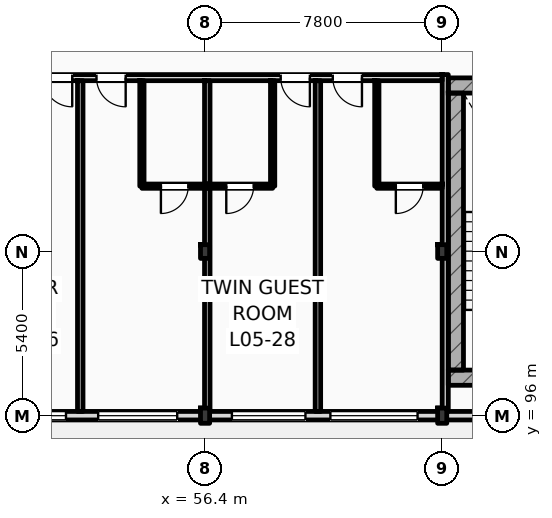
"""IFC4 building model, lengths in metres.
Left out: names, types, materials, properties, quantities, classifications, styles, units other than length and angle.
Written with IfcOpenShell. Run it as: python <this file> out.ifc"""

import sys

from ifc_helpers import new_model, si_unit, direction, frame, frame_2d, origin, origin_2d, place, context, subcontext, project, spatial, rectangle, i_section, extrude, element, fill, save


model = new_model("IFC4")
c1 = context("Model", 3, precision=1e-05, world=origin(), true_north=direction((0.0, 1.0)))
c2 = subcontext(c1, "Body", "Model", "MODEL_VIEW")
j1 = project(units=[si_unit("LENGTHUNIT", "METRE"), si_unit("PLANEANGLEUNIT", "RADIAN")], contexts=[c1])
p1 = place(None, origin())
s1 = spatial("IfcSite", under=j1, at=p1, CompositionType="ELEMENT")
p2 = place(p1, origin())
s2 = spatial("IfcBuilding", under=s1, at=p2, CompositionType="ELEMENT")
p3 = place(p2, frame((0.0, 0.0, 24.6)))
s3 = spatial("IfcBuildingStorey", under=s2, at=p3, CompositionType="ELEMENT", Elevation=24.6)
p4 = place(p3, frame((56.4, 96.0, 0.0), z_axis=(0.0, 0.0, 1.0), x_axis=(1.0, 0.0, 0.0)))
e1 = element("IfcColumn", 1, at=p4, inside=s3, PredefinedType="COLUMN", context=c2, shape_type="SweptSolid", body=[
    extrude(i_section(OverallWidth=0.3, OverallDepth=0.5, WebThickness=0.014, FlangeThickness=0.028, FilletRadius=0.027, at=origin_2d()), origin(), (0.0, 0.0, 1.0), 3.6),
])
p5 = place(p3, frame((56.4, 101.4, 0.0), z_axis=(0.0, 0.0, 1.0), x_axis=(1.0, 0.0, 0.0)))
e2 = element("IfcColumn", 2, at=p5, inside=s3, PredefinedType="COLUMN", context=c2, shape_type="SweptSolid", body=[
    extrude(i_section(OverallWidth=0.3, OverallDepth=0.45, WebThickness=0.014, FlangeThickness=0.026, FilletRadius=0.027, at=origin_2d()), origin(), (0.0, 0.0, 1.0), 3.6),
])
p6 = place(p3, frame((64.2, 96.0, 0.0), z_axis=(0.0, 0.0, 1.0), x_axis=(1.0, 0.0, 0.0)))
e3 = element("IfcColumn", 3, at=p6, inside=s3, PredefinedType="COLUMN", context=c2, shape_type="SweptSolid", body=[
    extrude(i_section(OverallWidth=0.3, OverallDepth=0.5, WebThickness=0.014, FlangeThickness=0.028, FilletRadius=0.027, at=origin_2d()), origin(), (0.0, 0.0, 1.0), 3.6),
])
p7 = place(p3, frame((64.2, 101.4, 0.0), z_axis=(0.0, 0.0, 1.0), x_axis=(1.0, 0.0, 0.0)))
e4 = element("IfcColumn", 4, at=p7, inside=s3, PredefinedType="COLUMN", context=c2, shape_type="SweptSolid", body=[
    extrude(i_section(OverallWidth=0.3, OverallDepth=0.45, WebThickness=0.014, FlangeThickness=0.026, FilletRadius=0.027, at=origin_2d()), origin(), (0.0, 0.0, 1.0), 3.6),
])
for number, where, z_axis, x_axis in (
    (5, (64.4, 106.862, 0.0), (0.0, 0.0, 1.0), (1.0, 0.0, 0.0)),
    (6, (64.4, 97.25, 0.0), (0.0, 0.0, 1.0), (1.0, 0.0, 0.0)),
):
    element("IfcWall", number, at=place(p3, frame(where, z_axis=z_axis, x_axis=x_axis)), inside=s3, PredefinedType="SHEAR", context=c2, shape_type="SweptSolid", body=[
        extrude(rectangle(XDim=5.16, YDim=0.5, at=frame_2d((2.58, 0.0))), origin(), (0.0, 0.0, 1.0), 3.6),
    ])
p8 = place(p3, frame((64.65, 97.5, 0.0), z_axis=(0.0, 0.0, 1.0), x_axis=(0.0, 1.0, 0.0)))
e7 = element("IfcWall", 7, at=p8, inside=s3, PredefinedType="SHEAR", context=c2, shape_type="SweptSolid", body=[
    extrude(rectangle(XDim=9.112, YDim=0.5, at=frame_2d((4.556, 0.0))), origin(), (0.0, 0.0, 1.0), 3.6),
])
p9 = place(p3, frame((25.2, 96.0, 0.0), z_axis=(0.0, 0.0, 1.0), x_axis=(1.0, 0.0, 0.0)))
e8 = element("IfcWall", 8, at=p9, inside=s3, PredefinedType="STANDARD", context=c2, shape_type="SweptSolid", body=[
    extrude(rectangle(XDim=94.8, YDim=0.28, at=frame_2d((47.4, 0.0))), origin(), (0.0, 0.0, 1.0), 2.78),
])
p10 = place(p9, frame((16.539, 0.0, 0.9)))
e9 = element("IfcOpeningElement", 9, at=p10, cuts=e8, PredefinedType="OPENING", context=c2, shape_type="SweptSolid", body=[
    extrude(rectangle(XDim=1.75, YDim=1.7, at=frame_2d((0.875, 0.85))), frame((0.0, 0.15, 0.0), z_axis=(0.0, -1.0, 0.0), x_axis=(1.0, 0.0, 0.0)), (0.0, 0.0, 1.0), 0.3),
])
p11 = place(p9, frame((20.367, 0.0, 0.9)))
e10 = element("IfcOpeningElement", 10, at=p11, cuts=e8, PredefinedType="OPENING", context=c2, shape_type="SweptSolid", body=[
    extrude(rectangle(XDim=2.0, YDim=1.7, at=frame_2d((1.0, 0.85))), frame((0.0, 0.15, 0.0), z_axis=(0.0, -1.0, 0.0), x_axis=(1.0, 0.0, 0.0)), (0.0, 0.0, 1.0), 0.3),
])
p12 = place(p9, frame((24.326, 0.0, 0.9)))
e11 = element("IfcOpeningElement", 11, at=p12, cuts=e8, PredefinedType="OPENING", context=c2, shape_type="SweptSolid", body=[
    extrude(rectangle(XDim=2.3, YDim=1.7, at=frame_2d((1.15, 0.85))), frame((0.0, 0.15, 0.0), z_axis=(0.0, -1.0, 0.0), x_axis=(1.0, 0.0, 0.0)), (0.0, 0.0, 1.0), 0.3),
])
p13 = place(p9, frame((27.684, 0.0, 0.9)))
e12 = element("IfcOpeningElement", 12, at=p13, cuts=e8, PredefinedType="OPENING", context=c2, shape_type="SweptSolid", body=[
    extrude(rectangle(XDim=2.6, YDim=1.7, at=frame_2d((1.3, 0.85))), frame((0.0, 0.15, 0.0), z_axis=(0.0, -1.0, 0.0), x_axis=(1.0, 0.0, 0.0)), (0.0, 0.0, 1.0), 0.3),
])
p14 = place(p9, frame((32.083, 0.0, 0.9)))
e13 = element("IfcOpeningElement", 13, at=p14, cuts=e8, PredefinedType="OPENING", context=c2, shape_type="SweptSolid", body=[
    extrude(rectangle(XDim=2.419, YDim=1.7, at=frame_2d((1.209, 0.85))), frame((0.0, 0.15, 0.0), z_axis=(0.0, -1.0, 0.0), x_axis=(1.0, 0.0, 0.0)), (0.0, 0.0, 1.0), 0.3),
])
p15 = place(p9, frame((35.322, 0.0, 0.9)))
e14 = element("IfcOpeningElement", 14, at=p15, cuts=e8, PredefinedType="OPENING", context=c2, shape_type="SweptSolid", body=[
    extrude(rectangle(XDim=2.868, YDim=1.7, at=frame_2d((1.434, 0.85))), frame((0.0, 0.15, 0.0), z_axis=(0.0, -1.0, 0.0), x_axis=(1.0, 0.0, 0.0)), (0.0, 0.0, 1.0), 0.3),
])
p16 = place(p9, frame((56.015, 0.0, 0.9)))
e15 = element("IfcOpeningElement", 15, at=p16, cuts=e8, PredefinedType="OPENING", context=c2, shape_type="SweptSolid", body=[
    extrude(rectangle(XDim=1.2, YDim=1.7, at=frame_2d((0.6, 0.85))), frame((0.0, 0.15, 0.0), z_axis=(0.0, -1.0, 0.0), x_axis=(1.0, 0.0, 0.0)), (0.0, 0.0, 1.0), 0.3),
])
p17 = place(p9, frame((59.888, 0.0, 0.9)))
e16 = element("IfcOpeningElement", 16, at=p17, cuts=e8, PredefinedType="OPENING", context=c2, shape_type="SweptSolid", body=[
    extrude(rectangle(XDim=1.35, YDim=1.7, at=frame_2d((0.675, 0.85))), frame((0.0, 0.15, 0.0), z_axis=(0.0, -1.0, 0.0), x_axis=(1.0, 0.0, 0.0)), (0.0, 0.0, 1.0), 0.3),
])
p18 = place(p9, frame((63.799, 0.0, 0.9)))
e17 = element("IfcOpeningElement", 17, at=p18, cuts=e8, PredefinedType="OPENING", context=c2, shape_type="SweptSolid", body=[
    extrude(rectangle(XDim=1.5, YDim=1.7, at=frame_2d((0.75, 0.85))), frame((0.0, 0.15, 0.0), z_axis=(0.0, -1.0, 0.0), x_axis=(1.0, 0.0, 0.0)), (0.0, 0.0, 1.0), 0.3),
])
p19 = place(p9, frame((67.709, 0.0, 0.9)))
e18 = element("IfcOpeningElement", 18, at=p19, cuts=e8, PredefinedType="OPENING", context=c2, shape_type="SweptSolid", body=[
    extrude(rectangle(XDim=1.65, YDim=1.7, at=frame_2d((0.825, 0.85))), frame((0.0, 0.15, 0.0), z_axis=(0.0, -1.0, 0.0), x_axis=(1.0, 0.0, 0.0)), (0.0, 0.0, 1.0), 0.3),
])
p20 = place(p9, frame((71.618, 0.0, 0.9)))
e19 = element("IfcOpeningElement", 19, at=p20, cuts=e8, PredefinedType="OPENING", context=c2, shape_type="SweptSolid", body=[
    extrude(rectangle(XDim=1.8, YDim=1.7, at=frame_2d((0.9, 0.85))), frame((0.0, 0.15, 0.0), z_axis=(0.0, -1.0, 0.0), x_axis=(1.0, 0.0, 0.0)), (0.0, 0.0, 1.0), 0.3),
])
p21 = place(p9, frame((75.129, 0.0, 0.9)))
e20 = element("IfcOpeningElement", 20, at=p21, cuts=e8, PredefinedType="OPENING", context=c2, shape_type="SweptSolid", body=[
    extrude(rectangle(XDim=1.95, YDim=1.7, at=frame_2d((0.975, 0.85))), frame((0.0, 0.15, 0.0), z_axis=(0.0, -1.0, 0.0), x_axis=(1.0, 0.0, 0.0)), (0.0, 0.0, 1.0), 0.3),
])
p22 = place(p9, frame((79.439, 0.0, 0.9)))
e21 = element("IfcOpeningElement", 21, at=p22, cuts=e8, PredefinedType="OPENING", context=c2, shape_type="SweptSolid", body=[
    extrude(rectangle(XDim=2.1, YDim=1.7, at=frame_2d((1.05, 0.85))), frame((0.0, 0.15, 0.0), z_axis=(0.0, -1.0, 0.0), x_axis=(1.0, 0.0, 0.0)), (0.0, 0.0, 1.0), 0.3),
])
p23 = place(p9, frame((83.349, 0.0, 0.9)))
e22 = element("IfcOpeningElement", 22, at=p23, cuts=e8, PredefinedType="OPENING", context=c2, shape_type="SweptSolid", body=[
    extrude(rectangle(XDim=2.25, YDim=1.7, at=frame_2d((1.125, 0.85))), frame((0.0, 0.15, 0.0), z_axis=(0.0, -1.0, 0.0), x_axis=(1.0, 0.0, 0.0)), (0.0, 0.0, 1.0), 0.3),
])
p24 = place(p9, frame((87.258, 0.0, 0.9)))
e23 = element("IfcOpeningElement", 23, at=p24, cuts=e8, PredefinedType="OPENING", context=c2, shape_type="SweptSolid", body=[
    extrude(rectangle(XDim=2.4, YDim=1.7, at=frame_2d((1.2, 0.85))), frame((0.0, 0.15, 0.0), z_axis=(0.0, -1.0, 0.0), x_axis=(1.0, 0.0, 0.0)), (0.0, 0.0, 1.0), 0.3),
])
p25 = place(p9, frame((91.204, 0.0, 0.9)))
e24 = element("IfcOpeningElement", 24, at=p25, cuts=e8, PredefinedType="OPENING", context=c2, shape_type="SweptSolid", body=[
    extrude(rectangle(XDim=2.55, YDim=1.7, at=frame_2d((1.275, 0.85))), frame((0.0, 0.15, 0.0), z_axis=(0.0, -1.0, 0.0), x_axis=(1.0, 0.0, 0.0)), (0.0, 0.0, 1.0), 0.3),
])
p26 = place(p3, frame((40.76, 107.12, 0.0), z_axis=(0.0, 0.0, 1.0), x_axis=(1.0, 0.0, 0.0)))
e25 = element("IfcWall", 25, at=p26, inside=s3, PredefinedType="PARTITIONING", context=c2, shape_type="SweptSolid", body=[
    extrude(rectangle(XDim=23.44, YDim=0.2, at=frame_2d((11.72, 0.0))), origin(), (0.0, 0.0, 1.0), 3.34),
])
p27 = place(p26, frame((2.449, 0.0, 0.0)))
e26 = element("IfcOpeningElement", 26, at=p27, cuts=e25, PredefinedType="OPENING", context=c2, shape_type="SweptSolid", body=[
    extrude(rectangle(XDim=0.96, YDim=2.2, at=frame_2d((0.48, 1.1))), frame((0.0, 0.11, 0.0), z_axis=(0.0, -1.0, 0.0), x_axis=(1.0, 0.0, 0.0)), (0.0, 0.0, 1.0), 0.22),
])
p28 = place(p26, frame((4.253, 0.0, 0.0)))
e27 = element("IfcOpeningElement", 27, at=p28, cuts=e25, PredefinedType="OPENING", context=c2, shape_type="SweptSolid", body=[
    extrude(rectangle(XDim=0.96, YDim=2.2, at=frame_2d((0.48, 1.1))), frame((0.0, 0.11, 0.0), z_axis=(0.0, -1.0, 0.0), x_axis=(1.0, 0.0, 0.0)), (0.0, 0.0, 1.0), 0.22),
])
p29 = place(p26, frame((10.311, 0.0, 0.0)))
e28 = element("IfcOpeningElement", 28, at=p29, cuts=e25, PredefinedType="OPENING", context=c2, shape_type="SweptSolid", body=[
    extrude(rectangle(XDim=0.96, YDim=2.2, at=frame_2d((0.48, 1.1))), frame((0.0, 0.11, 0.0), z_axis=(0.0, -1.0, 0.0), x_axis=(1.0, 0.0, 0.0)), (0.0, 0.0, 1.0), 0.22),
])
p30 = place(p26, frame((12.069, 0.0, 0.0)))
e29 = element("IfcOpeningElement", 29, at=p30, cuts=e25, PredefinedType="OPENING", context=c2, shape_type="SweptSolid", body=[
    extrude(rectangle(XDim=0.96, YDim=2.2, at=frame_2d((0.48, 1.1))), frame((0.0, 0.11, 0.0), z_axis=(0.0, -1.0, 0.0), x_axis=(1.0, 0.0, 0.0)), (0.0, 0.0, 1.0), 0.22),
])
p31 = place(p26, frame((18.128, 0.0, 0.0)))
e30 = element("IfcOpeningElement", 30, at=p31, cuts=e25, PredefinedType="OPENING", context=c2, shape_type="SweptSolid", body=[
    extrude(rectangle(XDim=0.96, YDim=2.2, at=frame_2d((0.48, 1.1))), frame((0.0, 0.11, 0.0), z_axis=(0.0, -1.0, 0.0), x_axis=(1.0, 0.0, 0.0)), (0.0, 0.0, 1.0), 0.22),
])
p32 = place(p26, frame((19.841, 0.0, 0.0)))
e31 = element("IfcOpeningElement", 31, at=p32, cuts=e25, PredefinedType="OPENING", context=c2, shape_type="SweptSolid", body=[
    extrude(rectangle(XDim=0.96, YDim=2.2, at=frame_2d((0.48, 1.1))), frame((0.0, 0.11, 0.0), z_axis=(0.0, -1.0, 0.0), x_axis=(1.0, 0.0, 0.0)), (0.0, 0.0, 1.0), 0.22),
])
p33 = place(p3, frame((64.3, 96.14, 0.0), z_axis=(0.0, 0.0, 1.0), x_axis=(0.0, 1.0, 0.0)))
e32 = element("IfcWall", 32, at=p33, inside=s3, PredefinedType="PARTITIONING", context=c2, shape_type="SweptSolid", body=[
    extrude(rectangle(XDim=11.08, YDim=0.2, at=frame_2d((5.54, 0.0))), origin(), (0.0, 0.0, 1.0), 2.93),
])
p34 = place(p3, frame((52.295, 96.14, 0.0), z_axis=(0.0, 0.0, 1.0), x_axis=(0.0, 1.0, 0.0)))
e33 = element("IfcWall", 33, at=p34, inside=s3, PredefinedType="PARTITIONING", context=c2, shape_type="SweptSolid", body=[
    extrude(rectangle(XDim=10.88, YDim=0.18, at=frame_2d((5.44, 0.0))), origin(), (0.0, 0.0, 1.0), 3.34),
])
p35 = place(p3, frame((56.473, 96.14, 0.0), z_axis=(0.0, 0.0, 1.0), x_axis=(0.0, 1.0, 0.0)))
e34 = element("IfcWall", 34, at=p35, inside=s3, PredefinedType="PARTITIONING", context=c2, shape_type="SweptSolid", body=[
    extrude(rectangle(XDim=10.88, YDim=0.18, at=frame_2d((5.44, 0.0))), origin(), (0.0, 0.0, 1.0), 2.93),
])
p36 = place(p3, frame((54.323, 103.55, 0.0), z_axis=(0.0, 0.0, 1.0), x_axis=(0.0, 1.0, 0.0)))
e35 = element("IfcWall", 35, at=p36, inside=s3, PredefinedType="PARTITIONING", context=c2, shape_type="SweptSolid", body=[
    extrude(rectangle(XDim=3.47, YDim=0.14, at=frame_2d((1.735, 0.0))), origin(), (0.0, 0.0, 1.0), 3.34),
])
p37 = place(p3, frame((54.323, 103.55, 0.0), z_axis=(0.0, 0.0, 1.0), x_axis=(1.0, 0.0, 0.0)))
e36 = element("IfcWall", 36, at=p37, inside=s3, PredefinedType="PARTITIONING", context=c2, shape_type="SweptSolid", body=[
    extrude(rectangle(XDim=2.15, YDim=0.14, at=frame_2d((1.075, 0.0))), origin(), (0.0, 0.0, 1.0), 3.34),
])
p38 = place(p37, frame((0.625, 0.0, 0.0)))
e37 = element("IfcOpeningElement", 37, at=p38, cuts=e36, PredefinedType="OPENING", context=c2, shape_type="SweptSolid", body=[
    extrude(rectangle(XDim=0.9, YDim=2.1, at=frame_2d((0.45, 1.05))), frame((0.0, 0.08, 0.0), z_axis=(0.0, -1.0, 0.0), x_axis=(1.0, 0.0, 0.0)), (0.0, 0.0, 1.0), 0.16),
])
p39 = place(p3, frame((60.112, 96.14, 0.0), z_axis=(0.0, 0.0, 1.0), x_axis=(0.0, 1.0, 0.0)))
e38 = element("IfcWall", 38, at=p39, inside=s3, PredefinedType="PARTITIONING", context=c2, shape_type="SweptSolid", body=[
    extrude(rectangle(XDim=10.88, YDim=0.18, at=frame_2d((5.44, 0.0))), origin(), (0.0, 0.0, 1.0), 3.34),
])
p40 = place(p3, frame((58.623, 103.55, 0.0), z_axis=(0.0, 0.0, 1.0), x_axis=(0.0, 1.0, 0.0)))
e39 = element("IfcWall", 39, at=p40, inside=s3, PredefinedType="PARTITIONING", context=c2, shape_type="SweptSolid", body=[
    extrude(rectangle(XDim=3.47, YDim=0.14, at=frame_2d((1.735, 0.0))), origin(), (0.0, 0.0, 1.0), 3.34),
])
p41 = place(p3, frame((56.473, 103.55, 0.0), z_axis=(0.0, 0.0, 1.0), x_axis=(1.0, 0.0, 0.0)))
e40 = element("IfcWall", 40, at=p41, inside=s3, PredefinedType="PARTITIONING", context=c2, shape_type="SweptSolid", body=[
    extrude(rectangle(XDim=2.15, YDim=0.14, at=frame_2d((1.075, 0.0))), origin(), (0.0, 0.0, 1.0), 3.34),
])
p42 = place(p41, frame((0.625, 0.0, 0.0)))
e41 = element("IfcOpeningElement", 41, at=p42, cuts=e40, PredefinedType="OPENING", context=c2, shape_type="SweptSolid", body=[
    extrude(rectangle(XDim=0.9, YDim=2.1, at=frame_2d((0.45, 1.05))), frame((0.0, 0.08, 0.0), z_axis=(0.0, -1.0, 0.0), x_axis=(1.0, 0.0, 0.0)), (0.0, 0.0, 1.0), 0.16),
])
p43 = place(p3, frame((62.05, 103.55, 0.0), z_axis=(0.0, 0.0, 1.0), x_axis=(0.0, 1.0, 0.0)))
e42 = element("IfcWall", 42, at=p43, inside=s3, PredefinedType="PARTITIONING", context=c2, shape_type="SweptSolid", body=[
    extrude(rectangle(XDim=3.47, YDim=0.14, at=frame_2d((1.735, 0.0))), origin(), (0.0, 0.0, 1.0), 3.34),
])
p44 = place(p3, frame((62.05, 103.55, 0.0), z_axis=(0.0, 0.0, 1.0), x_axis=(1.0, 0.0, 0.0)))
e43 = element("IfcWall", 43, at=p44, inside=s3, PredefinedType="PARTITIONING", context=c2, shape_type="SweptSolid", body=[
    extrude(rectangle(XDim=2.15, YDim=0.14, at=frame_2d((1.075, 0.0))), origin(), (0.0, 0.0, 1.0), 3.34),
])
p45 = place(p44, frame((0.625, 0.0, 0.0)))
e44 = element("IfcOpeningElement", 44, at=p45, cuts=e43, PredefinedType="OPENING", context=c2, shape_type="SweptSolid", body=[
    extrude(rectangle(XDim=0.9, YDim=2.1, at=frame_2d((0.45, 1.05))), frame((0.0, 0.08, 0.0), z_axis=(0.0, -1.0, 0.0), x_axis=(1.0, 0.0, 0.0)), (0.0, 0.0, 1.0), 0.16),
])
p46 = place(p12, origin())
e45 = element("IfcWindow", 45, at=p46, inside=s3, PartitioningType="DOUBLE_PANEL_VERTICAL", PredefinedType="WINDOW", context=c2, shape_type="SweptSolid", body=[
    extrude(rectangle(XDim=2.3, YDim=1.7, at=frame_2d((1.15, 0.85))), frame((0.0, 0.03, 0.0), z_axis=(0.0, -1.0, 0.0), x_axis=(1.0, 0.0, 0.0)), (0.0, 0.0, 1.0), 0.06),
])
fill(e11, e45)
p47 = place(p13, origin())
e46 = element("IfcWindow", 46, at=p47, inside=s3, PartitioningType="DOUBLE_PANEL_VERTICAL", PredefinedType="WINDOW", context=c2, shape_type="SweptSolid", body=[
    extrude(rectangle(XDim=2.6, YDim=1.7, at=frame_2d((1.3, 0.85))), frame((0.0, 0.03, 0.0), z_axis=(0.0, -1.0, 0.0), x_axis=(1.0, 0.0, 0.0)), (0.0, 0.0, 1.0), 0.06),
])
fill(e12, e46)
p48 = place(p14, origin())
e47 = element("IfcWindow", 47, at=p48, inside=s3, PartitioningType="DOUBLE_PANEL_VERTICAL", PredefinedType="WINDOW", context=c2, shape_type="SweptSolid", body=[
    extrude(rectangle(XDim=2.419, YDim=1.7, at=frame_2d((1.209, 0.85))), frame((0.0, 0.03, 0.0), z_axis=(0.0, -1.0, 0.0), x_axis=(1.0, 0.0, 0.0)), (0.0, 0.0, 1.0), 0.06),
])
fill(e13, e47)
p49 = place(p15, origin())
e48 = element("IfcWindow", 48, at=p49, inside=s3, PartitioningType="DOUBLE_PANEL_VERTICAL", PredefinedType="WINDOW", context=c2, shape_type="SweptSolid", body=[
    extrude(rectangle(XDim=2.868, YDim=1.7, at=frame_2d((1.434, 0.85))), frame((0.0, 0.03, 0.0), z_axis=(0.0, -1.0, 0.0), x_axis=(1.0, 0.0, 0.0)), (0.0, 0.0, 1.0), 0.06),
])
fill(e14, e48)
p50 = place(p29, frame((0.96, 0.0, 0.0), z_axis=(0.0, 0.0, 1.0), x_axis=(-1.0, 0.0, 0.0)))
e49 = element("IfcDoor", 49, at=p50, inside=s3, OperationType="SINGLE_SWING_RIGHT", PredefinedType="DOOR", context=c2, shape_type="SweptSolid", body=[
    extrude(rectangle(XDim=0.96, YDim=2.2, at=frame_2d((0.48, 1.1))), frame((0.0, 0.025, 0.0), z_axis=(0.0, -1.0, 0.0), x_axis=(1.0, 0.0, 0.0)), (0.0, 0.0, 1.0), 0.05),
])
fill(e28, e49)
p51 = place(p30, frame((0.96, 0.0, 0.0), z_axis=(0.0, 0.0, 1.0), x_axis=(-1.0, 0.0, 0.0)))
e50 = element("IfcDoor", 50, at=p51, inside=s3, OperationType="SINGLE_SWING_RIGHT", PredefinedType="DOOR", context=c2, shape_type="SweptSolid", body=[
    extrude(rectangle(XDim=0.96, YDim=2.2, at=frame_2d((0.48, 1.1))), frame((0.0, 0.025, 0.0), z_axis=(0.0, -1.0, 0.0), x_axis=(1.0, 0.0, 0.0)), (0.0, 0.0, 1.0), 0.05),
])
fill(e29, e50)
p52 = place(p38, frame((0.9, 0.0, 0.0), z_axis=(0.0, 0.0, 1.0), x_axis=(-1.0, 0.0, 0.0)))
e51 = element("IfcDoor", 51, at=p52, inside=s3, OperationType="SINGLE_SWING_LEFT", PredefinedType="DOOR", context=c2, shape_type="SweptSolid", body=[
    extrude(rectangle(XDim=0.9, YDim=2.1, at=frame_2d((0.45, 1.05))), frame((0.0, 0.025, 0.0), z_axis=(0.0, -1.0, 0.0), x_axis=(1.0, 0.0, 0.0)), (0.0, 0.0, 1.0), 0.05),
])
fill(e37, e51)
p53 = place(p31, frame((0.96, 0.0, 0.0), z_axis=(0.0, 0.0, 1.0), x_axis=(-1.0, 0.0, 0.0)))
e52 = element("IfcDoor", 52, at=p53, inside=s3, OperationType="SINGLE_SWING_RIGHT", PredefinedType="DOOR", context=c2, shape_type="SweptSolid", body=[
    extrude(rectangle(XDim=0.96, YDim=2.2, at=frame_2d((0.48, 1.1))), frame((0.0, 0.025, 0.0), z_axis=(0.0, -1.0, 0.0), x_axis=(1.0, 0.0, 0.0)), (0.0, 0.0, 1.0), 0.05),
])
fill(e30, e52)
p54 = place(p42, frame((0.9, 0.0, 0.0), z_axis=(0.0, 0.0, 1.0), x_axis=(-1.0, 0.0, 0.0)))
e53 = element("IfcDoor", 53, at=p54, inside=s3, OperationType="SINGLE_SWING_LEFT", PredefinedType="DOOR", context=c2, shape_type="SweptSolid", body=[
    extrude(rectangle(XDim=0.9, YDim=2.1, at=frame_2d((0.45, 1.05))), frame((0.0, 0.025, 0.0), z_axis=(0.0, -1.0, 0.0), x_axis=(1.0, 0.0, 0.0)), (0.0, 0.0, 1.0), 0.05),
])
fill(e41, e53)
p55 = place(p32, frame((0.96, 0.0, 0.0), z_axis=(0.0, 0.0, 1.0), x_axis=(-1.0, 0.0, 0.0)))
e54 = element("IfcDoor", 54, at=p55, inside=s3, OperationType="SINGLE_SWING_RIGHT", PredefinedType="DOOR", context=c2, shape_type="SweptSolid", body=[
    extrude(rectangle(XDim=0.96, YDim=2.2, at=frame_2d((0.48, 1.1))), frame((0.0, 0.025, 0.0), z_axis=(0.0, -1.0, 0.0), x_axis=(1.0, 0.0, 0.0)), (0.0, 0.0, 1.0), 0.05),
])
fill(e31, e54)
p56 = place(p45, frame((0.9, 0.0, 0.0), z_axis=(0.0, 0.0, 1.0), x_axis=(-1.0, 0.0, 0.0)))
e55 = element("IfcDoor", 55, at=p56, inside=s3, OperationType="SINGLE_SWING_LEFT", PredefinedType="DOOR", context=c2, shape_type="SweptSolid", body=[
    extrude(rectangle(XDim=0.9, YDim=2.1, at=frame_2d((0.45, 1.05))), frame((0.0, 0.025, 0.0), z_axis=(0.0, -1.0, 0.0), x_axis=(1.0, 0.0, 0.0)), (0.0, 0.0, 1.0), 0.05),
])
fill(e44, e55)
save(model, sys.argv[1])
